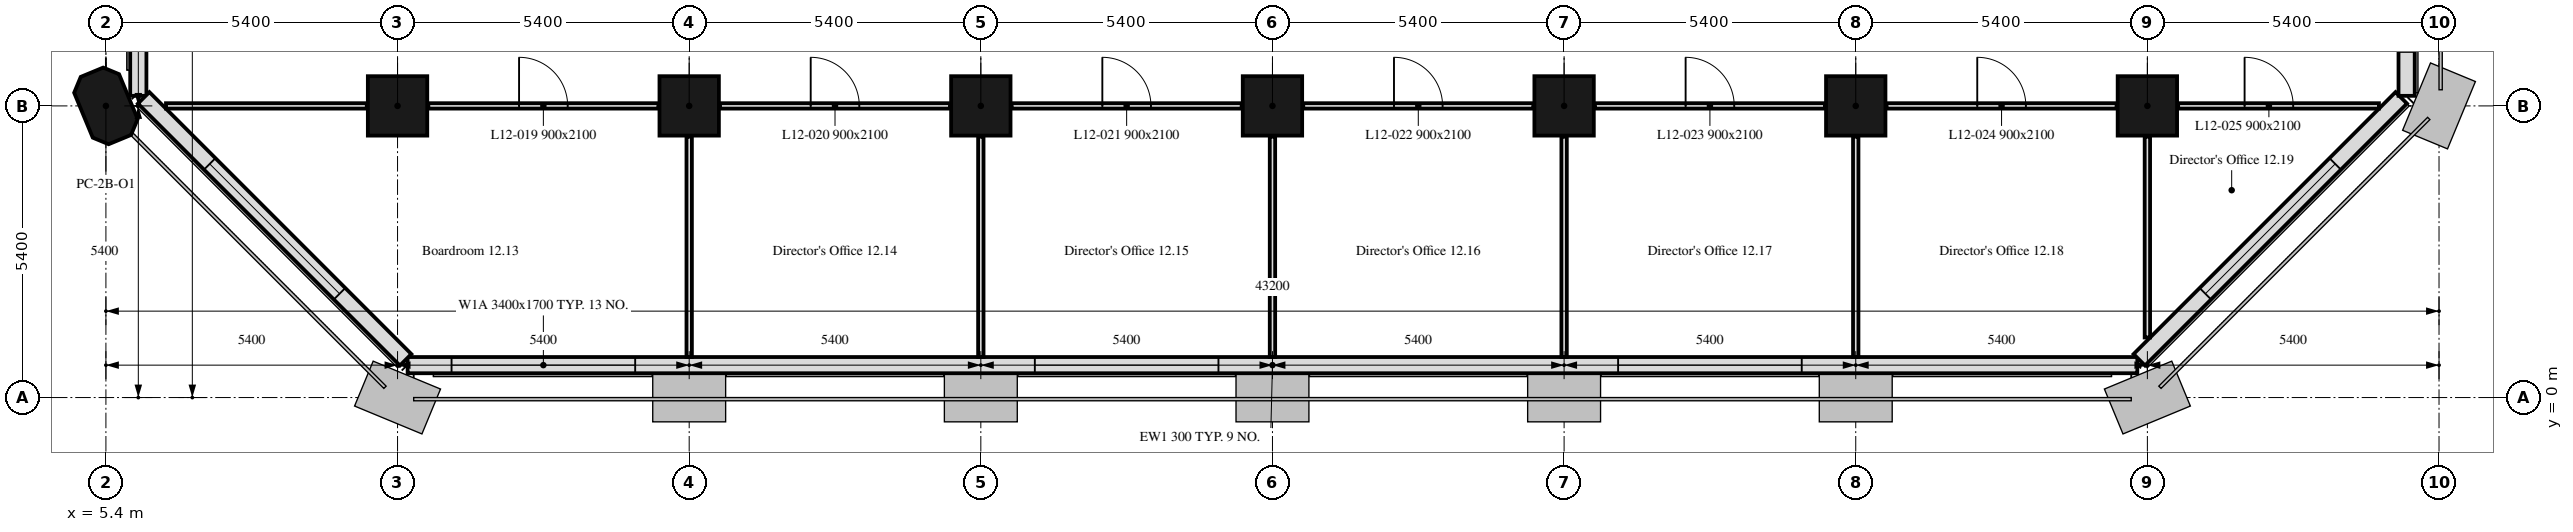
"""IFC4 building model, lengths in metres.
Left out: names, types, materials, properties, quantities, classifications, styles, units other than length and angle.
Written with IfcOpenShell. Run it as: python <this file> out.ifc"""

import sys

from ifc_helpers import new_model, si_unit, direction, frame, frame_2d, origin, origin_2d, place, context, subcontext, project, spatial, polyline, rectangle, outline, extrude, element, fill, save


model = new_model("IFC4")
c1 = context("Model", 3, precision=1e-05, world=origin(), true_north=direction((0.0, 1.0)))
c2 = subcontext(c1, "Body", "Model", "MODEL_VIEW")
j1 = project(units=[si_unit("LENGTHUNIT", "METRE"), si_unit("PLANEANGLEUNIT", "RADIAN")], contexts=[c1])
p1 = place(None, origin())
s1 = spatial("IfcSite", under=j1, at=p1, CompositionType="ELEMENT")
p2 = place(p1, origin())
s2 = spatial("IfcBuilding", under=s1, at=p2, CompositionType="ELEMENT")
p3 = place(p2, frame((0.0, 0.0, 56.4)))
s3 = spatial("IfcBuildingStorey", under=s2, at=p3, CompositionType="ELEMENT", Elevation=56.4)
p4 = place(p3, frame((5.4, 5.4, 0.0), z_axis=(0.0, 0.0, 1.0), x_axis=(-0.382683432365, 0.923879532511, 0.0)))
e1 = element("IfcColumn", 1, at=p4, inside=s3, PredefinedType="COLUMN", context=c2, shape_type="SweptSolid", body=[
    extrude(outline(polyline([(-0.45, -0.45), (0.45, -0.45), (0.675, -0.225), (0.675, 0.225), (0.45, 0.45), (-0.45, 0.45), (-0.675, 0.225), (-0.675, -0.225), (-0.45, -0.45)])), origin(), (0.0, 0.0, 1.0), 3.3),
])
for number, where, z_axis, x_axis in (
    (2, (10.8, 5.4, 0.0), (0.0, 0.0, 1.0), (1.0, 0.0, 0.0)),
    (3, (16.2, 5.4, 0.0), (0.0, 0.0, 1.0), (1.0, 0.0, 0.0)),
    (4, (21.6, 5.4, 0.0), (0.0, 0.0, 1.0), (1.0, 0.0, 0.0)),
    (5, (27.0, 5.4, 0.0), (0.0, 0.0, 1.0), (1.0, 0.0, 0.0)),
    (6, (32.4, 5.4, 0.0), (0.0, 0.0, 1.0), (1.0, 0.0, 0.0)),
    (7, (37.8, 5.4, 0.0), (0.0, 0.0, 1.0), (1.0, 0.0, 0.0)),
    (8, (43.2, 5.4, 0.0), (0.0, 0.0, 1.0), (1.0, 0.0, 0.0)),
):
    element("IfcColumn", number, at=place(p3, frame(where, z_axis=z_axis, x_axis=x_axis)), inside=s3, PredefinedType="COLUMN", context=c2, shape_type="SweptSolid", body=[
        extrude(rectangle(XDim=1.1, YDim=1.1, at=origin_2d()), origin(), (0.0, 0.0, 1.0), 3.3),
    ])
p5 = place(p3, frame((10.986, 0.6, 0.0), z_axis=(0.0, 0.0, 1.0), x_axis=(1.0, 0.0, 0.0)))
e9 = element("IfcWall", 9, at=p5, inside=s3, PredefinedType="SOLIDWALL", context=c2, shape_type="SweptSolid", body=[
    extrude(rectangle(XDim=32.027, YDim=0.3, at=frame_2d((16.014, 0.0))), origin(), (0.0, 0.0, 1.0), 3.3),
])
p6 = place(p5, frame((0.814, 0.0, 0.9)))
e10 = element("IfcOpeningElement", 10, at=p6, cuts=e9, PredefinedType="OPENING", context=c2, shape_type="SweptSolid", body=[
    extrude(rectangle(XDim=3.4, YDim=1.7, at=frame_2d((1.7, 0.85))), frame((0.0, 0.16, 0.0), z_axis=(0.0, -1.0, 0.0), x_axis=(1.0, 0.0, 0.0)), (0.0, 0.0, 1.0), 0.32),
])
p7 = place(p5, frame((11.614, 0.0, 0.9)))
e11 = element("IfcOpeningElement", 11, at=p7, cuts=e9, PredefinedType="OPENING", context=c2, shape_type="SweptSolid", body=[
    extrude(rectangle(XDim=3.4, YDim=1.7, at=frame_2d((1.7, 0.85))), frame((0.0, 0.16, 0.0), z_axis=(0.0, -1.0, 0.0), x_axis=(1.0, 0.0, 0.0)), (0.0, 0.0, 1.0), 0.32),
])
p8 = place(p5, frame((22.414, 0.0, 0.9)))
e12 = element("IfcOpeningElement", 12, at=p8, cuts=e9, PredefinedType="OPENING", context=c2, shape_type="SweptSolid", body=[
    extrude(rectangle(XDim=3.4, YDim=1.7, at=frame_2d((1.7, 0.85))), frame((0.0, 0.16, 0.0), z_axis=(0.0, -1.0, 0.0), x_axis=(1.0, 0.0, 0.0)), (0.0, 0.0, 1.0), 0.32),
])
p9 = place(p3, frame((43.051, 0.699, 0.0), z_axis=(0.0, 0.0, 1.0), x_axis=(0.707106781187, 0.707106781187, 0.0)))
e13 = element("IfcWall", 13, at=p9, inside=s3, PredefinedType="SOLIDWALL", context=c2, shape_type="SweptSolid", body=[
    extrude(rectangle(XDim=6.86, YDim=0.3, at=frame_2d((3.43, 0.0))), origin(), (0.0, 0.0, 1.0), 3.3),
])
p10 = place(p9, frame((1.73, 0.0, 0.9)))
e14 = element("IfcOpeningElement", 14, at=p10, cuts=e13, PredefinedType="OPENING", context=c2, shape_type="SweptSolid", body=[
    extrude(rectangle(XDim=3.4, YDim=1.7, at=frame_2d((1.7, 0.85))), frame((0.0, 0.16, 0.0), z_axis=(0.0, -1.0, 0.0), x_axis=(1.0, 0.0, 0.0)), (0.0, 0.0, 1.0), 0.32),
])
p11 = place(p3, frame((48.0, 5.586, 0.0), z_axis=(0.0, 0.0, 1.0), x_axis=(0.0, 1.0, 0.0)))
e15 = element("IfcWall", 15, at=p11, inside=s3, PredefinedType="SOLIDWALL", context=c2, shape_type="SweptSolid", body=[
    extrude(rectangle(XDim=32.027, YDim=0.3, at=frame_2d((16.014, 0.0))), origin(), (0.0, 0.0, 1.0), 3.3),
])
p12 = place(p11, frame((0.814, 0.0, 0.9)))
e16 = element("IfcOpeningElement", 16, at=p12, cuts=e15, PredefinedType="OPENING", context=c2, shape_type="SweptSolid", body=[
    extrude(rectangle(XDim=3.4, YDim=1.7, at=frame_2d((1.7, 0.85))), frame((0.0, 0.16, 0.0), z_axis=(0.0, -1.0, 0.0), x_axis=(1.0, 0.0, 0.0)), (0.0, 0.0, 1.0), 0.32),
])
p13 = place(p11, frame((11.614, 0.0, 0.9)))
e17 = element("IfcOpeningElement", 17, at=p13, cuts=e15, PredefinedType="OPENING", context=c2, shape_type="SweptSolid", body=[
    extrude(rectangle(XDim=3.4, YDim=1.7, at=frame_2d((1.7, 0.85))), frame((0.0, 0.16, 0.0), z_axis=(0.0, -1.0, 0.0), x_axis=(1.0, 0.0, 0.0)), (0.0, 0.0, 1.0), 0.32),
])
p14 = place(p11, frame((22.414, 0.0, 0.9)))
e18 = element("IfcOpeningElement", 18, at=p14, cuts=e15, PredefinedType="OPENING", context=c2, shape_type="SweptSolid", body=[
    extrude(rectangle(XDim=3.4, YDim=1.7, at=frame_2d((1.7, 0.85))), frame((0.0, 0.16, 0.0), z_axis=(0.0, -1.0, 0.0), x_axis=(1.0, 0.0, 0.0)), (0.0, 0.0, 1.0), 0.32),
])
p15 = place(p3, frame((6.0, 16.2, 0.0), z_axis=(0.0, 0.0, 1.0), x_axis=(0.0, -1.0, 0.0)))
e19 = element("IfcWall", 19, at=p15, inside=s3, PredefinedType="SOLIDWALL", context=c2, shape_type="SweptSolid", body=[
    extrude(rectangle(XDim=10.614, YDim=0.3, at=frame_2d((5.307, 0.0))), origin(), (0.0, 0.0, 1.0), 3.3),
])
p16 = place(p15, frame((1.35, 0.0, 0.9)))
e20 = element("IfcOpeningElement", 20, at=p16, cuts=e19, PredefinedType="OPENING", context=c2, shape_type="SweptSolid", body=[
    extrude(rectangle(XDim=1.1, YDim=1.7, at=frame_2d((0.55, 0.85))), frame((0.0, 0.16, 0.0), z_axis=(0.0, -1.0, 0.0), x_axis=(1.0, 0.0, 0.0)), (0.0, 0.0, 1.0), 0.32),
])
p17 = place(p15, frame((2.95, 0.0, 0.9)))
e21 = element("IfcOpeningElement", 21, at=p17, cuts=e19, PredefinedType="OPENING", context=c2, shape_type="SweptSolid", body=[
    extrude(rectangle(XDim=1.1, YDim=1.7, at=frame_2d((0.55, 0.85))), frame((0.0, 0.16, 0.0), z_axis=(0.0, -1.0, 0.0), x_axis=(1.0, 0.0, 0.0)), (0.0, 0.0, 1.0), 0.32),
])
p18 = place(p3, frame((6.099, 5.55, 0.0), z_axis=(0.0, 0.0, 1.0), x_axis=(0.707106781187, -0.707106781187, 0.0)))
e22 = element("IfcWall", 22, at=p18, inside=s3, PredefinedType="SOLIDWALL", context=c2, shape_type="SweptSolid", body=[
    extrude(rectangle(XDim=6.86, YDim=0.3, at=frame_2d((3.43, 0.0))), origin(), (0.0, 0.0, 1.0), 3.3),
])
p19 = place(p18, frame((1.73, 0.0, 0.9)))
e23 = element("IfcOpeningElement", 23, at=p19, cuts=e22, PredefinedType="OPENING", context=c2, shape_type="SweptSolid", body=[
    extrude(rectangle(XDim=3.4, YDim=1.7, at=frame_2d((1.7, 0.85))), frame((0.0, 0.16, 0.0), z_axis=(0.0, -1.0, 0.0), x_axis=(1.0, 0.0, 0.0)), (0.0, 0.0, 1.0), 0.32),
])
p20 = place(p3, frame((6.512, 5.4, 0.0), z_axis=(0.0, 0.0, 1.0), x_axis=(1.0, 0.0, 0.0)))
e24 = element("IfcWall", 24, at=p20, inside=s3, PredefinedType="PARTITIONING", context=c2, shape_type="SweptSolid", body=[
    extrude(rectangle(XDim=3.718, YDim=0.1, at=frame_2d((1.859, 0.0))), origin(), (0.0, 0.0, 1.0), 3.3),
])
p21 = place(p3, frame((11.37, 5.4, 0.0), z_axis=(0.0, 0.0, 1.0), x_axis=(1.0, 0.0, 0.0)))
e25 = element("IfcWall", 25, at=p21, inside=s3, PredefinedType="PARTITIONING", context=c2, shape_type="SweptSolid", body=[
    extrude(rectangle(XDim=4.26, YDim=0.1, at=frame_2d((2.13, 0.0))), origin(), (0.0, 0.0, 1.0), 3.3),
])
p22 = place(p21, frame((1.68, 0.0, 0.0)))
e26 = element("IfcOpeningElement", 26, at=p22, cuts=e25, PredefinedType="OPENING", context=c2, shape_type="SweptSolid", body=[
    extrude(rectangle(XDim=0.9, YDim=2.1, at=frame_2d((0.45, 1.05))), frame((0.0, 0.05, 0.0), z_axis=(0.0, -1.0, 0.0), x_axis=(1.0, 0.0, 0.0)), (0.0, 0.0, 1.0), 0.1),
])
p23 = place(p3, frame((16.77, 5.4, 0.0), z_axis=(0.0, 0.0, 1.0), x_axis=(1.0, 0.0, 0.0)))
e27 = element("IfcWall", 27, at=p23, inside=s3, PredefinedType="PARTITIONING", context=c2, shape_type="SweptSolid", body=[
    extrude(rectangle(XDim=4.26, YDim=0.1, at=frame_2d((2.13, 0.0))), origin(), (0.0, 0.0, 1.0), 3.3),
])
p24 = place(p23, frame((1.68, 0.0, 0.0)))
e28 = element("IfcOpeningElement", 28, at=p24, cuts=e27, PredefinedType="OPENING", context=c2, shape_type="SweptSolid", body=[
    extrude(rectangle(XDim=0.9, YDim=2.1, at=frame_2d((0.45, 1.05))), frame((0.0, 0.05, 0.0), z_axis=(0.0, -1.0, 0.0), x_axis=(1.0, 0.0, 0.0)), (0.0, 0.0, 1.0), 0.1),
])
p25 = place(p3, frame((22.17, 5.4, 0.0), z_axis=(0.0, 0.0, 1.0), x_axis=(1.0, 0.0, 0.0)))
e29 = element("IfcWall", 29, at=p25, inside=s3, PredefinedType="PARTITIONING", context=c2, shape_type="SweptSolid", body=[
    extrude(rectangle(XDim=4.26, YDim=0.1, at=frame_2d((2.13, 0.0))), origin(), (0.0, 0.0, 1.0), 3.3),
])
p26 = place(p25, frame((1.68, 0.0, 0.0)))
e30 = element("IfcOpeningElement", 30, at=p26, cuts=e29, PredefinedType="OPENING", context=c2, shape_type="SweptSolid", body=[
    extrude(rectangle(XDim=0.9, YDim=2.1, at=frame_2d((0.45, 1.05))), frame((0.0, 0.05, 0.0), z_axis=(0.0, -1.0, 0.0), x_axis=(1.0, 0.0, 0.0)), (0.0, 0.0, 1.0), 0.1),
])
p27 = place(p3, frame((27.57, 5.4, 0.0), z_axis=(0.0, 0.0, 1.0), x_axis=(1.0, 0.0, 0.0)))
e31 = element("IfcWall", 31, at=p27, inside=s3, PredefinedType="PARTITIONING", context=c2, shape_type="SweptSolid", body=[
    extrude(rectangle(XDim=4.26, YDim=0.1, at=frame_2d((2.13, 0.0))), origin(), (0.0, 0.0, 1.0), 3.3),
])
p28 = place(p27, frame((1.68, 0.0, 0.0)))
e32 = element("IfcOpeningElement", 32, at=p28, cuts=e31, PredefinedType="OPENING", context=c2, shape_type="SweptSolid", body=[
    extrude(rectangle(XDim=0.9, YDim=2.1, at=frame_2d((0.45, 1.05))), frame((0.0, 0.05, 0.0), z_axis=(0.0, -1.0, 0.0), x_axis=(1.0, 0.0, 0.0)), (0.0, 0.0, 1.0), 0.1),
])
p29 = place(p3, frame((32.97, 5.4, 0.0), z_axis=(0.0, 0.0, 1.0), x_axis=(1.0, 0.0, 0.0)))
e33 = element("IfcWall", 33, at=p29, inside=s3, PredefinedType="PARTITIONING", context=c2, shape_type="SweptSolid", body=[
    extrude(rectangle(XDim=4.26, YDim=0.1, at=frame_2d((2.13, 0.0))), origin(), (0.0, 0.0, 1.0), 3.3),
])
p30 = place(p29, frame((1.68, 0.0, 0.0)))
e34 = element("IfcOpeningElement", 34, at=p30, cuts=e33, PredefinedType="OPENING", context=c2, shape_type="SweptSolid", body=[
    extrude(rectangle(XDim=0.9, YDim=2.1, at=frame_2d((0.45, 1.05))), frame((0.0, 0.05, 0.0), z_axis=(0.0, -1.0, 0.0), x_axis=(1.0, 0.0, 0.0)), (0.0, 0.0, 1.0), 0.1),
])
p31 = place(p3, frame((38.37, 5.4, 0.0), z_axis=(0.0, 0.0, 1.0), x_axis=(1.0, 0.0, 0.0)))
e35 = element("IfcWall", 35, at=p31, inside=s3, PredefinedType="PARTITIONING", context=c2, shape_type="SweptSolid", body=[
    extrude(rectangle(XDim=4.26, YDim=0.1, at=frame_2d((2.13, 0.0))), origin(), (0.0, 0.0, 1.0), 3.3),
])
p32 = place(p31, frame((1.68, 0.0, 0.0)))
e36 = element("IfcOpeningElement", 36, at=p32, cuts=e35, PredefinedType="OPENING", context=c2, shape_type="SweptSolid", body=[
    extrude(rectangle(XDim=0.9, YDim=2.1, at=frame_2d((0.45, 1.05))), frame((0.0, 0.05, 0.0), z_axis=(0.0, -1.0, 0.0), x_axis=(1.0, 0.0, 0.0)), (0.0, 0.0, 1.0), 0.1),
])
p33 = place(p3, frame((43.77, 5.4, 0.0), z_axis=(0.0, 0.0, 1.0), x_axis=(1.0, 0.0, 0.0)))
e37 = element("IfcWall", 37, at=p33, inside=s3, PredefinedType="PARTITIONING", context=c2, shape_type="SweptSolid", body=[
    extrude(rectangle(XDim=3.718, YDim=0.1, at=frame_2d((1.859, 0.0))), origin(), (0.0, 0.0, 1.0), 3.3),
])
p34 = place(p33, frame((1.23, 0.0, 0.0)))
e38 = element("IfcOpeningElement", 38, at=p34, cuts=e37, PredefinedType="OPENING", context=c2, shape_type="SweptSolid", body=[
    extrude(rectangle(XDim=0.9, YDim=2.1, at=frame_2d((0.45, 1.05))), frame((0.0, 0.05, 0.0), z_axis=(0.0, -1.0, 0.0), x_axis=(1.0, 0.0, 0.0)), (0.0, 0.0, 1.0), 0.1),
])
for number, where, z_axis, x_axis in (
    (39, (16.2, 0.751, 0.0), (0.0, 0.0, 1.0), (0.0, 1.0, 0.0)),
    (40, (21.6, 0.751, 0.0), (0.0, 0.0, 1.0), (0.0, 1.0, 0.0)),
    (41, (27.0, 0.751, 0.0), (0.0, 0.0, 1.0), (0.0, 1.0, 0.0)),
    (42, (32.4, 0.751, 0.0), (0.0, 0.0, 1.0), (0.0, 1.0, 0.0)),
    (43, (37.8, 0.751, 0.0), (0.0, 0.0, 1.0), (0.0, 1.0, 0.0)),
):
    element("IfcWall", number, at=place(p3, frame(where, z_axis=z_axis, x_axis=x_axis)), inside=s3, PredefinedType="PARTITIONING", context=c2, shape_type="SweptSolid", body=[
        extrude(rectangle(XDim=4.079, YDim=0.1, at=frame_2d((2.04, 0.0))), origin(), (0.0, 0.0, 1.0), 2.55),
    ])
p35 = place(p3, frame((43.2, 1.112, 0.0), z_axis=(0.0, 0.0, 1.0), x_axis=(0.0, 1.0, 0.0)))
e44 = element("IfcWall", 44, at=p35, inside=s3, PredefinedType="PARTITIONING", context=c2, shape_type="SweptSolid", body=[
    extrude(rectangle(XDim=3.718, YDim=0.1, at=frame_2d((1.859, 0.0))), origin(), (0.0, 0.0, 1.0), 3.3),
])
p36 = place(p6, origin())
e45 = element("IfcWindow", 45, at=p36, inside=s3, PartitioningType="SINGLE_PANEL", PredefinedType="WINDOW", context=c2, shape_type="SweptSolid", body=[
    extrude(rectangle(XDim=3.4, YDim=1.7, at=frame_2d((1.7, 0.85))), frame((0.0, 0.03, 0.0), z_axis=(0.0, -1.0, 0.0), x_axis=(1.0, 0.0, 0.0)), (0.0, 0.0, 1.0), 0.06),
])
fill(e10, e45)
p37 = place(p7, origin())
e46 = element("IfcWindow", 46, at=p37, inside=s3, PartitioningType="SINGLE_PANEL", PredefinedType="WINDOW", context=c2, shape_type="SweptSolid", body=[
    extrude(rectangle(XDim=3.4, YDim=1.7, at=frame_2d((1.7, 0.85))), frame((0.0, 0.03, 0.0), z_axis=(0.0, -1.0, 0.0), x_axis=(1.0, 0.0, 0.0)), (0.0, 0.0, 1.0), 0.06),
])
fill(e11, e46)
p38 = place(p8, origin())
e47 = element("IfcWindow", 47, at=p38, inside=s3, PartitioningType="SINGLE_PANEL", PredefinedType="WINDOW", context=c2, shape_type="SweptSolid", body=[
    extrude(rectangle(XDim=3.4, YDim=1.7, at=frame_2d((1.7, 0.85))), frame((0.0, 0.03, 0.0), z_axis=(0.0, -1.0, 0.0), x_axis=(1.0, 0.0, 0.0)), (0.0, 0.0, 1.0), 0.06),
])
fill(e12, e47)
p39 = place(p10, origin())
e48 = element("IfcWindow", 48, at=p39, inside=s3, PartitioningType="SINGLE_PANEL", PredefinedType="WINDOW", context=c2, shape_type="SweptSolid", body=[
    extrude(rectangle(XDim=3.4, YDim=1.7, at=frame_2d((1.7, 0.85))), frame((0.0, 0.03, 0.0), z_axis=(0.0, -1.0, 0.0), x_axis=(1.0, 0.0, 0.0)), (0.0, 0.0, 1.0), 0.06),
])
fill(e14, e48)
p40 = place(p19, origin())
e49 = element("IfcWindow", 49, at=p40, inside=s3, PartitioningType="SINGLE_PANEL", PredefinedType="WINDOW", context=c2, shape_type="SweptSolid", body=[
    extrude(rectangle(XDim=3.4, YDim=1.7, at=frame_2d((1.7, 0.85))), frame((0.0, 0.03, 0.0), z_axis=(0.0, -1.0, 0.0), x_axis=(1.0, 0.0, 0.0)), (0.0, 0.0, 1.0), 0.06),
])
fill(e23, e49)
p41 = place(p22, origin())
e50 = element("IfcDoor", 50, at=p41, inside=s3, OperationType="SINGLE_SWING_RIGHT", PredefinedType="DOOR", context=c2, shape_type="SweptSolid", body=[
    extrude(rectangle(XDim=0.9, YDim=2.1, at=frame_2d((0.45, 1.05))), frame((0.0, 0.025, 0.0), z_axis=(0.0, -1.0, 0.0), x_axis=(1.0, 0.0, 0.0)), (0.0, 0.0, 1.0), 0.05),
])
fill(e26, e50)
p42 = place(p24, origin())
e51 = element("IfcDoor", 51, at=p42, inside=s3, OperationType="SINGLE_SWING_RIGHT", PredefinedType="DOOR", context=c2, shape_type="SweptSolid", body=[
    extrude(rectangle(XDim=0.9, YDim=2.1, at=frame_2d((0.45, 1.05))), frame((0.0, 0.025, 0.0), z_axis=(0.0, -1.0, 0.0), x_axis=(1.0, 0.0, 0.0)), (0.0, 0.0, 1.0), 0.05),
])
fill(e28, e51)
p43 = place(p26, origin())
e52 = element("IfcDoor", 52, at=p43, inside=s3, OperationType="SINGLE_SWING_RIGHT", PredefinedType="DOOR", context=c2, shape_type="SweptSolid", body=[
    extrude(rectangle(XDim=0.9, YDim=2.1, at=frame_2d((0.45, 1.05))), frame((0.0, 0.025, 0.0), z_axis=(0.0, -1.0, 0.0), x_axis=(1.0, 0.0, 0.0)), (0.0, 0.0, 1.0), 0.05),
])
fill(e30, e52)
p44 = place(p28, origin())
e53 = element("IfcDoor", 53, at=p44, inside=s3, OperationType="SINGLE_SWING_RIGHT", PredefinedType="DOOR", context=c2, shape_type="SweptSolid", body=[
    extrude(rectangle(XDim=0.9, YDim=2.1, at=frame_2d((0.45, 1.05))), frame((0.0, 0.025, 0.0), z_axis=(0.0, -1.0, 0.0), x_axis=(1.0, 0.0, 0.0)), (0.0, 0.0, 1.0), 0.05),
])
fill(e32, e53)
p45 = place(p30, origin())
e54 = element("IfcDoor", 54, at=p45, inside=s3, OperationType="SINGLE_SWING_LEFT", PredefinedType="DOOR", context=c2, shape_type="SweptSolid", body=[
    extrude(rectangle(XDim=0.9, YDim=2.1, at=frame_2d((0.45, 1.05))), frame((0.0, 0.025, 0.0), z_axis=(0.0, -1.0, 0.0), x_axis=(1.0, 0.0, 0.0)), (0.0, 0.0, 1.0), 0.05),
])
fill(e34, e54)
p46 = place(p32, origin())
e55 = element("IfcDoor", 55, at=p46, inside=s3, OperationType="SINGLE_SWING_LEFT", PredefinedType="DOOR", context=c2, shape_type="SweptSolid", body=[
    extrude(rectangle(XDim=0.9, YDim=2.1, at=frame_2d((0.45, 1.05))), frame((0.0, 0.025, 0.0), z_axis=(0.0, -1.0, 0.0), x_axis=(1.0, 0.0, 0.0)), (0.0, 0.0, 1.0), 0.05),
])
fill(e36, e55)
p47 = place(p34, origin())
e56 = element("IfcDoor", 56, at=p47, inside=s3, OperationType="SINGLE_SWING_LEFT", PredefinedType="DOOR", context=c2, shape_type="SweptSolid", body=[
    extrude(rectangle(XDim=0.9, YDim=2.1, at=frame_2d((0.45, 1.05))), frame((0.0, 0.025, 0.0), z_axis=(0.0, -1.0, 0.0), x_axis=(1.0, 0.0, 0.0)), (0.0, 0.0, 1.0), 0.05),
])
fill(e38, e56)
save(model, sys.argv[1])
